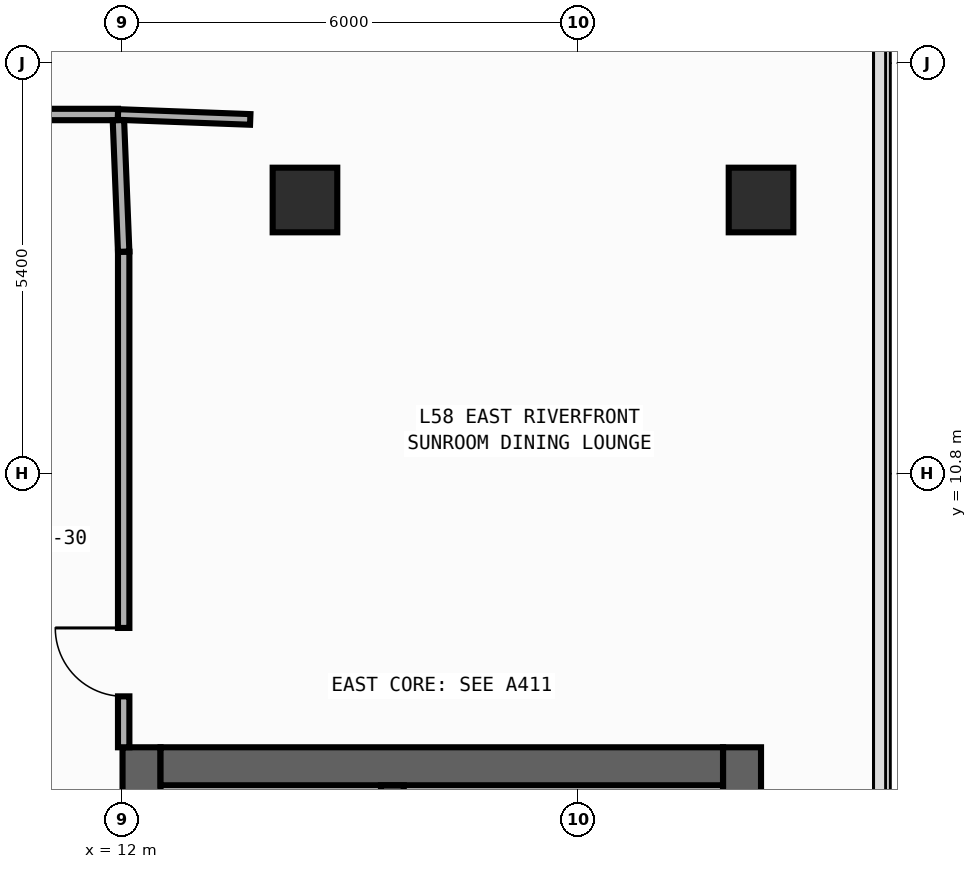
"""IFC4 building model, lengths in metres.
Left out: names, types, materials, properties, quantities, classifications, styles, units other than length and angle.
Written with IfcOpenShell. Run it as: python <this file> out.ifc"""

import sys

from ifc_helpers import new_model, si_unit, direction, frame, frame_2d, origin, origin_2d, place, context, subcontext, project, spatial, rectangle, extrude, element, fill, save


model = new_model("IFC4")
c1 = context("Model", 3, precision=1e-05, world=origin(), true_north=direction((0.0, 1.0)))
c2 = subcontext(c1, "Body", "Model", "MODEL_VIEW")
j1 = project(units=[si_unit("LENGTHUNIT", "METRE"), si_unit("PLANEANGLEUNIT", "RADIAN")], contexts=[c1])
p1 = place(None, origin())
s1 = spatial("IfcSite", under=j1, at=p1, CompositionType="ELEMENT")
p2 = place(p1, origin())
s2 = spatial("IfcBuilding", under=s1, at=p2, CompositionType="ELEMENT")
p3 = place(p2, frame((0.0, 0.0, 247.6)))
s3 = spatial("IfcBuildingStorey", under=s2, at=p3, CompositionType="ELEMENT", Elevation=247.6)
p4 = place(p3, frame((12.25, -19.8, 0.0), z_axis=(0.0, 0.0, 1.0), x_axis=(0.0, 1.0, 0.0)))
e1 = element("IfcWall", 1, at=p4, inside=s3, PredefinedType="SHEAR", context=c2, shape_type="SweptSolid", body=[
    extrude(rectangle(XDim=27.0, YDim=0.5, at=frame_2d((13.5, 0.0))), origin(), (0.0, 0.0, 1.0), 3.34),
])
p5 = place(p4, frame((23.05, 0.0, 0.0)))
e2 = element("IfcOpeningElement", 2, at=p5, cuts=e1, PredefinedType="OPENING", context=c2, shape_type="SweptSolid", body=[
    extrude(rectangle(XDim=1.1, YDim=2.2, at=frame_2d((0.55, 1.1))), frame((0.0, 0.26, 0.0), z_axis=(0.0, -1.0, 0.0), x_axis=(1.0, 0.0, 0.0)), (0.0, 0.0, 1.0), 0.52),
])
p6 = place(p4, frame((19.85, 0.0, 0.0)))
e3 = element("IfcOpeningElement", 3, at=p6, cuts=e1, PredefinedType="OPENING", context=c2, shape_type="SweptSolid", body=[
    extrude(rectangle(XDim=1.1, YDim=2.2, at=frame_2d((0.55, 1.1))), frame((0.0, 0.26, 0.0), z_axis=(0.0, -1.0, 0.0), x_axis=(1.0, 0.0, 0.0)), (0.0, 0.0, 1.0), 0.52),
])
p7 = place(p4, frame((16.65, 0.0, 0.0)))
e4 = element("IfcOpeningElement", 4, at=p7, cuts=e1, PredefinedType="OPENING", context=c2, shape_type="SweptSolid", body=[
    extrude(rectangle(XDim=1.1, YDim=2.2, at=frame_2d((0.55, 1.1))), frame((0.0, 0.26, 0.0), z_axis=(0.0, -1.0, 0.0), x_axis=(1.0, 0.0, 0.0)), (0.0, 0.0, 1.0), 0.52),
])
p8 = place(p4, frame((6.275, 0.0, 0.0)))
e5 = element("IfcOpeningElement", 5, at=p8, cuts=e1, PredefinedType="OPENING", context=c2, shape_type="SweptSolid", body=[
    extrude(rectangle(XDim=0.85, YDim=2.1, at=frame_2d((0.425, 1.05))), frame((0.0, 0.26, 0.0), z_axis=(0.0, -1.0, 0.0), x_axis=(1.0, 0.0, 0.0)), (0.0, 0.0, 1.0), 0.52),
])
p9 = place(p4, frame((8.575, 0.0, 0.0)))
e6 = element("IfcOpeningElement", 6, at=p9, cuts=e1, PredefinedType="OPENING", context=c2, shape_type="SweptSolid", body=[
    extrude(rectangle(XDim=0.85, YDim=2.1, at=frame_2d((0.425, 1.05))), frame((0.0, 0.26, 0.0), z_axis=(0.0, -1.0, 0.0), x_axis=(1.0, 0.0, 0.0)), (0.0, 0.0, 1.0), 0.52),
])
p10 = place(p4, frame((10.675, 0.0, 0.0)))
e7 = element("IfcOpeningElement", 7, at=p10, cuts=e1, PredefinedType="OPENING", context=c2, shape_type="SweptSolid", body=[
    extrude(rectangle(XDim=0.85, YDim=2.1, at=frame_2d((0.425, 1.05))), frame((0.0, 0.26, 0.0), z_axis=(0.0, -1.0, 0.0), x_axis=(1.0, 0.0, 0.0)), (0.0, 0.0, 1.0), 0.52),
])
p11 = place(p4, frame((12.725, 0.0, 0.0)))
e8 = element("IfcOpeningElement", 8, at=p11, cuts=e1, PredefinedType="OPENING", context=c2, shape_type="SweptSolid", body=[
    extrude(rectangle(XDim=1.15, YDim=2.2, at=frame_2d((0.575, 1.1))), frame((0.0, 0.26, 0.0), z_axis=(0.0, -1.0, 0.0), x_axis=(1.0, 0.0, 0.0)), (0.0, 0.0, 1.0), 0.52),
])
p12 = place(p4, frame((25.125, 0.0, 0.0)))
e9 = element("IfcOpeningElement", 9, at=p12, cuts=e1, PredefinedType="OPENING", context=c2, shape_type="SweptSolid", body=[
    extrude(rectangle(XDim=0.85, YDim=2.1, at=frame_2d((0.425, 1.05))), frame((0.0, 0.26, 0.0), z_axis=(0.0, -1.0, 0.0), x_axis=(1.0, 0.0, 0.0)), (0.0, 0.0, 1.0), 0.52),
])
p13 = place(p3, frame((20.15, -19.8, 0.0), z_axis=(0.0, 0.0, 1.0), x_axis=(0.0, 1.0, 0.0)))
e10 = element("IfcWall", 10, at=p13, inside=s3, PredefinedType="SHEAR", context=c2, shape_type="SweptSolid", body=[
    extrude(rectangle(XDim=27.0, YDim=0.5, at=frame_2d((13.5, 0.0))), origin(), (0.0, 0.0, 1.0), 3.34),
])
p14 = place(p3, frame((12.5, 6.95, 0.0), z_axis=(0.0, 0.0, 1.0), x_axis=(1.0, 0.0, 0.0)))
e11 = element("IfcWall", 11, at=p14, inside=s3, PredefinedType="SHEAR", context=c2, shape_type="SweptSolid", body=[
    extrude(rectangle(XDim=7.4, YDim=0.5, at=frame_2d((3.7, 0.0))), origin(), (0.0, 0.0, 1.0), 3.34),
])
p15 = place(p3, frame((15.55, -19.3, 0.0), z_axis=(0.0, 0.0, 1.0), x_axis=(0.0, 1.0, 0.0)))
e12 = element("IfcWall", 12, at=p15, inside=s3, PredefinedType="SHEAR", context=c2, shape_type="SweptSolid", body=[
    extrude(rectangle(XDim=26.0, YDim=0.3, at=frame_2d((13.0, 0.0))), origin(), (0.0, 0.0, 1.0), 3.34),
])
p16 = place(p15, frame((12.225, 0.0, 0.0)))
e13 = element("IfcOpeningElement", 13, at=p16, cuts=e12, PredefinedType="OPENING", context=c2, shape_type="SweptSolid", body=[
    extrude(rectangle(XDim=1.15, YDim=2.2, at=frame_2d((0.575, 1.1))), frame((0.0, 0.16, 0.0), z_axis=(0.0, -1.0, 0.0), x_axis=(1.0, 0.0, 0.0)), (0.0, 0.0, 1.0), 0.32),
])
p17 = place(p15, frame((24.625, 0.0, 0.0)))
e14 = element("IfcOpeningElement", 14, at=p17, cuts=e12, PredefinedType="OPENING", context=c2, shape_type="SweptSolid", body=[
    extrude(rectangle(XDim=0.85, YDim=2.1, at=frame_2d((0.425, 1.05))), frame((0.0, 0.16, 0.0), z_axis=(0.0, -1.0, 0.0), x_axis=(1.0, 0.0, 0.0)), (0.0, 0.0, 1.0), 0.32),
])
for number, where, z_axis, x_axis in (
    (15, (20.4, 14.4, 0.0), (0.0, 0.0, 1.0), (1.0, 0.0, 0.0)),
    (16, (14.4, 14.4, 0.0), (0.0, 0.0, 1.0), (1.0, 0.0, 0.0)),
):
    element("IfcColumn", number, at=place(p3, frame(where, z_axis=z_axis, x_axis=x_axis)), inside=s3, PredefinedType="COLUMN", context=c2, shape_type="SweptSolid", body=[
        extrude(rectangle(XDim=0.85, YDim=0.85, at=origin_2d()), origin(), (0.0, 0.0, 1.0), 3.6),
    ])
p18 = place(p3, frame((12.015, 7.2, 0.0), z_axis=(0.0, 0.0, 1.0), x_axis=(0.0, 1.0, 0.0)))
e17 = element("IfcWall", 17, at=p18, inside=s3, PredefinedType="PARTITIONING", context=c2, shape_type="SweptSolid", body=[
    extrude(rectangle(XDim=6.52, YDim=0.15, at=frame_2d((3.26, 0.0))), origin(), (0.0, 0.0, 1.0), 3.34),
])
p19 = place(p18, frame((0.67, 0.0, 0.0)))
e18 = element("IfcOpeningElement", 18, at=p19, cuts=e17, PredefinedType="OPENING", context=c2, shape_type="SweptSolid", body=[
    extrude(rectangle(XDim=0.9, YDim=2.15, at=frame_2d((0.45, 1.075))), frame((0.0, 0.085, 0.0), z_axis=(0.0, -1.0, 0.0), x_axis=(1.0, 0.0, 0.0)), (0.0, 0.0, 1.0), 0.17),
])
p20 = place(p3, frame((5.19, 15.525, 0.0), z_axis=(0.0, 0.0, 1.0), x_axis=(1.0, 0.0, 0.0)))
e19 = element("IfcWall", 19, at=p20, inside=s3, PredefinedType="PARTITIONING", context=c2, shape_type="SweptSolid", body=[
    extrude(rectangle(XDim=6.75, YDim=0.15, at=frame_2d((3.375, 0.0))), origin(), (0.0, 0.0, 1.0), 3.34),
])
p21 = place(p20, frame((1.487, 0.0, 0.0)))
e20 = element("IfcOpeningElement", 20, at=p21, cuts=e19, PredefinedType="OPENING", context=c2, shape_type="SweptSolid", body=[
    extrude(rectangle(XDim=0.9, YDim=2.15, at=frame_2d((0.45, 1.075))), frame((0.0, 0.085, 0.0), z_axis=(0.0, -1.0, 0.0), x_axis=(1.0, 0.0, 0.0)), (0.0, 0.0, 1.0), 0.17),
])
p22 = place(p3, frame((12.015, 13.72, 0.0), z_axis=(0.0, 0.0, 1.0), x_axis=(-0.040046877756, 0.99919780203, 0.0)))
e21 = element("IfcWall", 21, at=p22, inside=s3, PredefinedType="PARTITIONING", context=c2, shape_type="SweptSolid", body=[
    extrude(rectangle(XDim=1.731, YDim=0.15, at=frame_2d((0.866, 0.0))), origin(), (0.0, 0.0, 1.0), 3.34),
])
p23 = place(p3, frame((11.94, 15.525, 0.0), z_axis=(0.0, 0.0, 1.0), x_axis=(0.999304229002, -0.037296888581, 0.0)))
e22 = element("IfcWall", 22, at=p23, inside=s3, PredefinedType="PARTITIONING", context=c2, shape_type="SweptSolid", body=[
    extrude(rectangle(XDim=1.741, YDim=0.14, at=frame_2d((0.871, 0.0))), origin(), (0.0, 0.0, 1.0), 3.34),
])
p24 = place(p19, origin())
e23 = element("IfcDoor", 23, at=p24, inside=s3, OperationType="SINGLE_SWING_RIGHT", PredefinedType="DOOR", context=c2, shape_type="SweptSolid", body=[
    extrude(rectangle(XDim=0.9, YDim=2.15, at=frame_2d((0.45, 1.075))), frame((0.0, 0.025, 0.0), z_axis=(0.0, -1.0, 0.0), x_axis=(1.0, 0.0, 0.0)), (0.0, 0.0, 1.0), 0.05),
])
fill(e18, e23)
save(model, sys.argv[1])
